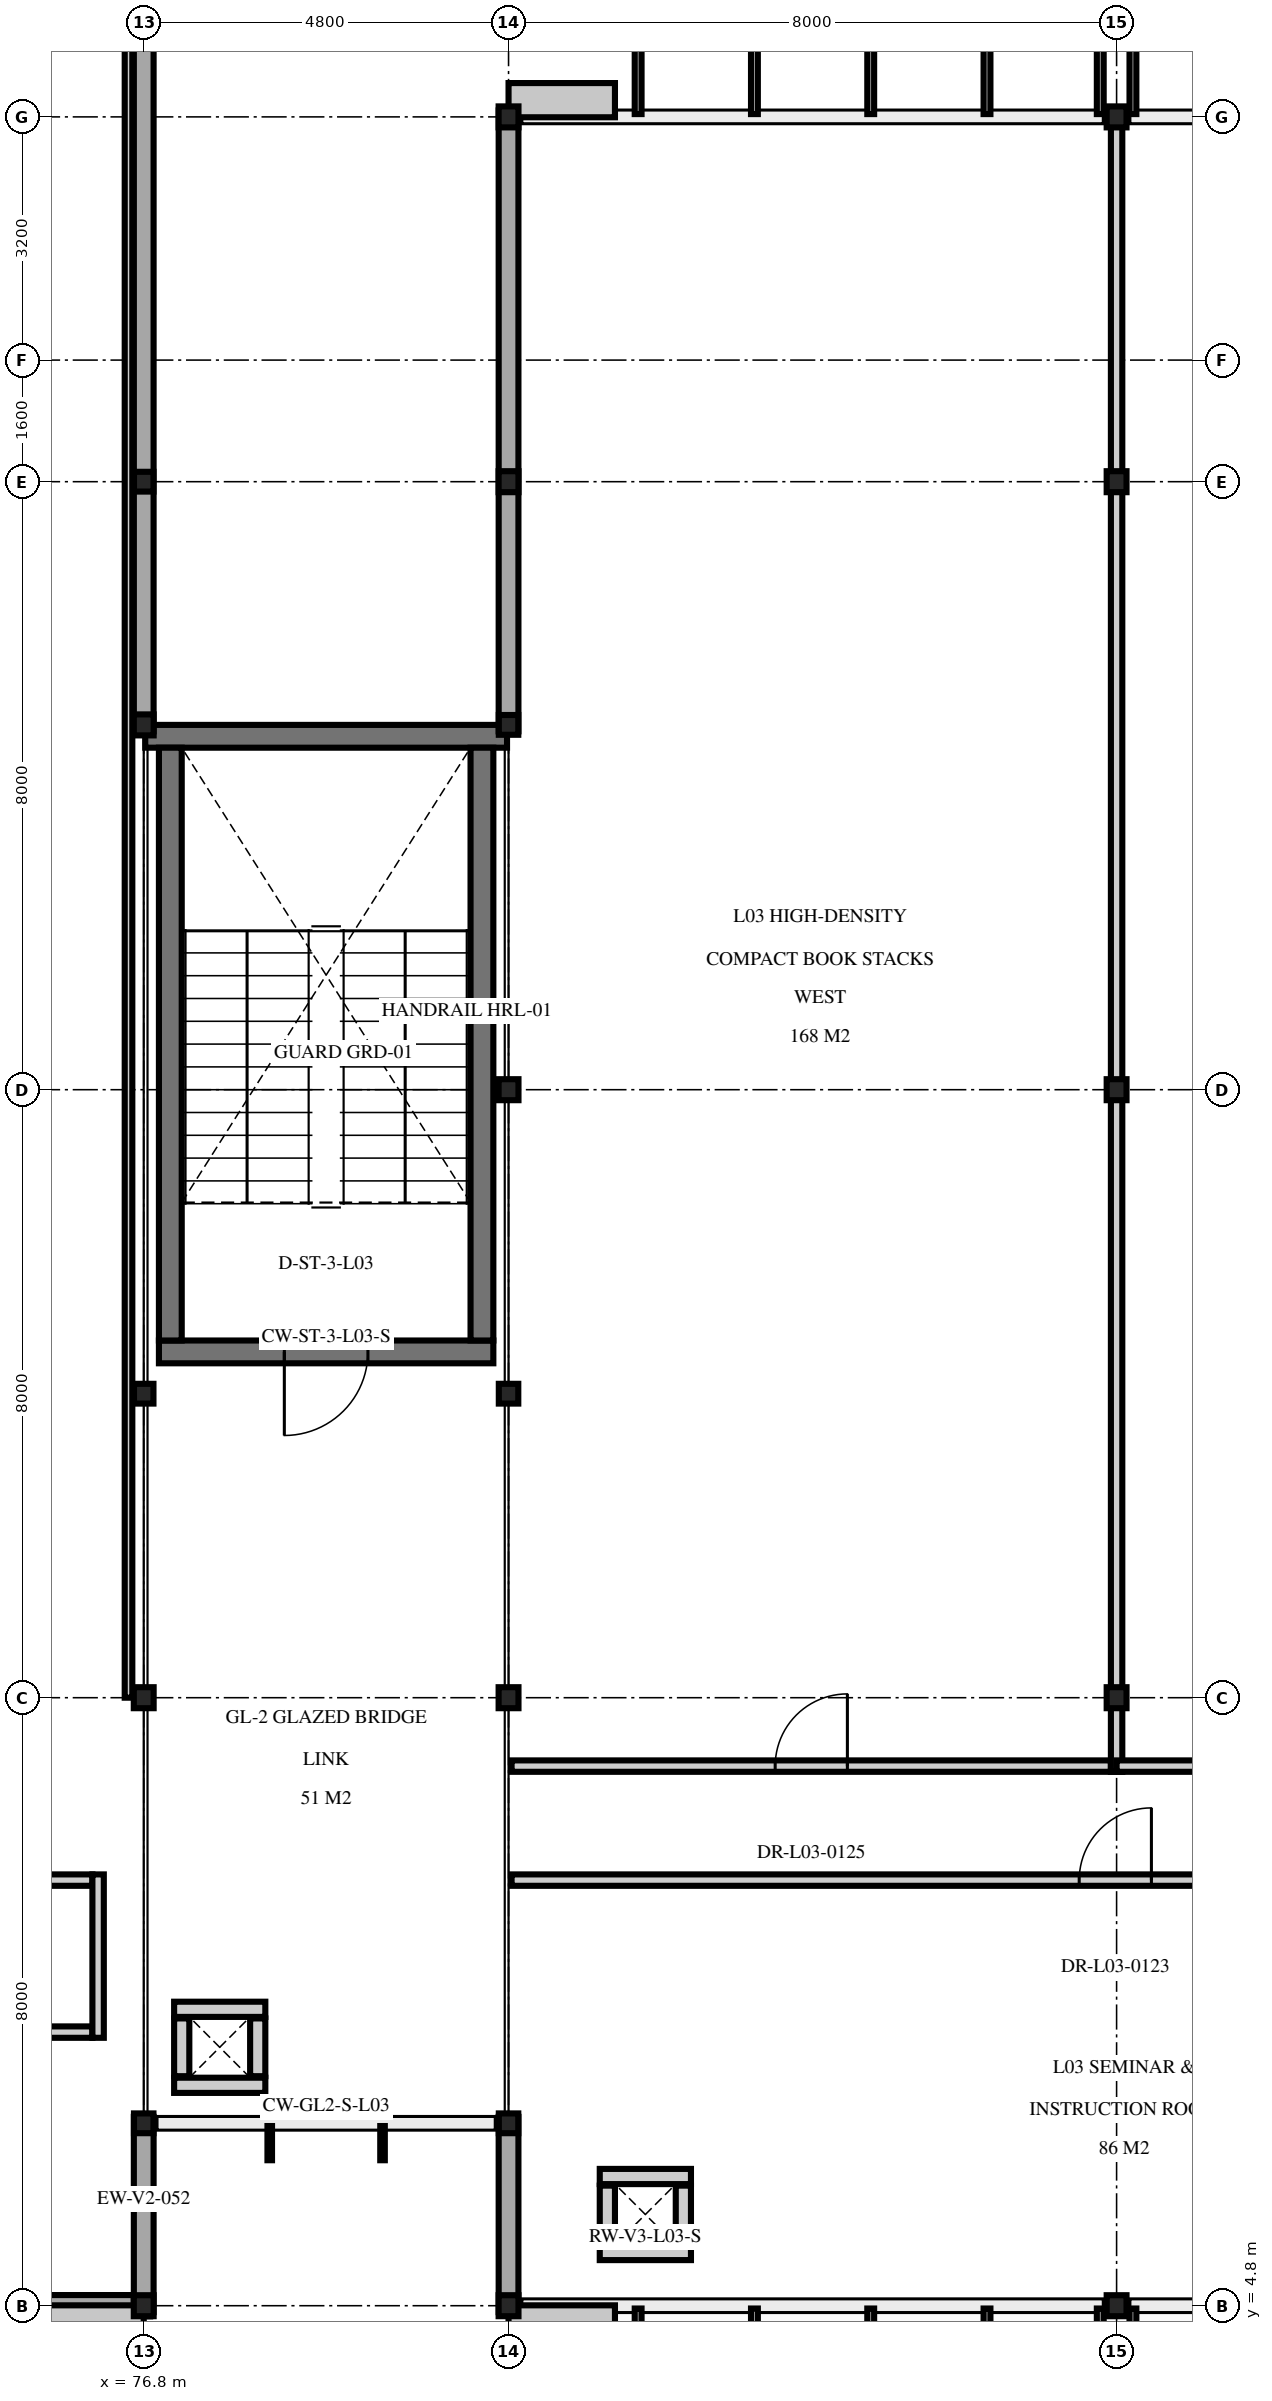
"""IFC4 building model, lengths in metres.
Left out: names, types, materials, properties, quantities, classifications, styles, units other than length and angle.
Written with IfcOpenShell. Run it as: python <this file> out.ifc"""

import sys

from ifc_helpers import new_model, si_unit, direction, frame, frame_2d, origin, origin_2d, place, context, subcontext, project, spatial, rectangle, i_section, extrude, element, fill, save


model = new_model("IFC4")
c1 = context("Model", 3, precision=1e-05, world=origin(), true_north=direction((0.0, 1.0)))
c2 = subcontext(c1, "Body", "Model", "MODEL_VIEW")
j1 = project(units=[si_unit("LENGTHUNIT", "METRE"), si_unit("PLANEANGLEUNIT", "RADIAN")], contexts=[c1])
p1 = place(None, origin())
s1 = spatial("IfcSite", under=j1, at=p1, CompositionType="ELEMENT")
p2 = place(p1, origin())
s2 = spatial("IfcBuilding", under=s1, at=p2, CompositionType="ELEMENT")
p3 = place(p2, frame((0.0, 0.0, 14.1)))
s3 = spatial("IfcBuildingStorey", under=s2, at=p3, CompositionType="ELEMENT", Elevation=14.1)
for number, where, z_axis, x_axis in (
    (1, (76.8, 4.8, 0.0), (0.0, 0.0, 1.0), (1.0, 0.0, 0.0)),
    (2, (76.8, 12.8, 0.0), (0.0, 0.0, 1.0), (1.0, 0.0, 0.0)),
    (3, (76.8, 25.6, 0.0), (0.0, 0.0, 1.0), (1.0, 0.0, 0.0)),
):
    element("IfcColumn", number, at=place(p3, frame(where, z_axis=z_axis, x_axis=x_axis)), inside=s3, PredefinedType="COLUMN", context=c2, shape_type="SweptSolid", body=[
        extrude(i_section(OverallWidth=0.261, OverallDepth=0.276, WebThickness=0.015, FlangeThickness=0.025, at=origin_2d()), origin(), (0.0, 0.0, 1.0), 4.5),
    ])
for number, where, z_axis, x_axis in (
    (4, (76.8, 28.8, 0.0), (0.0, 0.0, 1.0), (1.0, 0.0, 0.0)),
    (5, (76.8, 7.2, 0.0), (0.0, 0.0, 1.0), (1.0, 0.0, 0.0)),
    (6, (76.8, 16.8, 0.0), (0.0, 0.0, 1.0), (1.0, 0.0, 0.0)),
):
    element("IfcColumn", number, at=place(p3, frame(where, z_axis=z_axis, x_axis=x_axis)), inside=s3, PredefinedType="COLUMN", context=c2, shape_type="SweptSolid", body=[
        extrude(i_section(OverallWidth=0.256, OverallDepth=0.26, WebThickness=0.01, FlangeThickness=0.017, at=origin_2d()), origin(), (0.0, 0.0, 1.0), 4.5),
    ])
for number, where, z_axis, x_axis in (
    (7, (81.6, 4.8, 0.0), (0.0, 0.0, 1.0), (1.0, 0.0, 0.0)),
    (8, (81.6, 12.8, 0.0), (0.0, 0.0, 1.0), (1.0, 0.0, 0.0)),
    (9, (81.6, 20.8, 0.0), (0.0, 0.0, 1.0), (1.0, 0.0, 0.0)),
    (10, (81.6, 28.8, 0.0), (0.0, 0.0, 1.0), (1.0, 0.0, 0.0)),
):
    element("IfcColumn", number, at=place(p3, frame(where, z_axis=z_axis, x_axis=x_axis)), inside=s3, PredefinedType="COLUMN", context=c2, shape_type="SweptSolid", body=[
        extrude(i_section(OverallWidth=0.261, OverallDepth=0.276, WebThickness=0.015, FlangeThickness=0.025, at=origin_2d()), origin(), (0.0, 0.0, 1.0), 4.5),
    ])
p4 = place(p3, frame((81.6, 33.6, 0.0), z_axis=(0.0, 0.0, 1.0), x_axis=(1.0, 0.0, 0.0)))
e11 = element("IfcColumn", 11, at=p4, inside=s3, PredefinedType="COLUMN", context=c2, shape_type="SweptSolid", body=[
    extrude(i_section(OverallWidth=0.261, OverallDepth=0.276, WebThickness=0.015, FlangeThickness=0.025, at=origin_2d()), origin(), (0.0, 0.0, 1.0), 4.31),
])
for number, where, z_axis, x_axis in (
    (12, (89.6, 4.8, 0.0), (0.0, 0.0, 1.0), (1.0, 0.0, 0.0)),
    (13, (89.6, 12.8, 0.0), (0.0, 0.0, 1.0), (1.0, 0.0, 0.0)),
    (14, (89.6, 20.8, 0.0), (0.0, 0.0, 1.0), (1.0, 0.0, 0.0)),
    (15, (89.6, 28.8, 0.0), (0.0, 0.0, 1.0), (1.0, 0.0, 0.0)),
):
    element("IfcColumn", number, at=place(p3, frame(where, z_axis=z_axis, x_axis=x_axis)), inside=s3, PredefinedType="COLUMN", context=c2, shape_type="SweptSolid", body=[
        extrude(i_section(OverallWidth=0.261, OverallDepth=0.276, WebThickness=0.015, FlangeThickness=0.025, at=origin_2d()), origin(), (0.0, 0.0, 1.0), 4.5),
    ])
p5 = place(p3, frame((89.6, 33.6, 0.0), z_axis=(0.0, 0.0, 1.0), x_axis=(1.0, 0.0, 0.0)))
e16 = element("IfcColumn", 16, at=p5, inside=s3, PredefinedType="COLUMN", context=c2, shape_type="SweptSolid", body=[
    extrude(i_section(OverallWidth=0.261, OverallDepth=0.276, WebThickness=0.015, FlangeThickness=0.025, at=origin_2d()), origin(), (0.0, 0.0, 1.0), 4.31),
])
for number, where, z_axis, x_axis in (
    (17, (81.6, 7.2, 0.0), (0.0, 0.0, 1.0), (1.0, 0.0, 0.0)),
    (18, (81.6, 16.8, 0.0), (0.0, 0.0, 1.0), (1.0, 0.0, 0.0)),
    (19, (81.6, 25.6, 0.0), (0.0, 0.0, 1.0), (1.0, 0.0, 0.0)),
):
    element("IfcColumn", number, at=place(p3, frame(where, z_axis=z_axis, x_axis=x_axis)), inside=s3, PredefinedType="COLUMN", context=c2, shape_type="SweptSolid", body=[
        extrude(i_section(OverallWidth=0.256, OverallDepth=0.26, WebThickness=0.01, FlangeThickness=0.017, at=origin_2d()), origin(), (0.0, 0.0, 1.0), 4.5),
    ])
p6 = place(p3, frame((81.4, 17.35, 0.0), z_axis=(0.0, 0.0, 1.0), x_axis=(-1.0, 0.0, 0.0)))
e20 = element("IfcWall", 20, at=p6, inside=s3, PredefinedType="SHEAR", context=c2, shape_type="SweptSolid", body=[
    extrude(rectangle(XDim=4.4, YDim=0.3, at=frame_2d((2.2, 0.0))), origin(), (0.0, 0.0, 1.0), 4.25),
])
p7 = place(p6, frame((1.65, 0.0, 0.0)))
e21 = element("IfcOpeningElement", 21, at=p7, cuts=e20, PredefinedType="OPENING", context=c2, shape_type="SweptSolid", body=[
    extrude(rectangle(XDim=1.1, YDim=2.2, at=frame_2d((0.55, 1.1))), frame((0.0, 0.16, 0.0), z_axis=(0.0, -1.0, 0.0), x_axis=(1.0, 0.0, 0.0)), (0.0, 0.0, 1.0), 0.32),
])
p8 = place(p3, frame((76.82, 25.45, 0.0), z_axis=(0.0, 0.0, 1.0), x_axis=(1.0, 0.0, 0.0)))
e22 = element("IfcWall", 22, at=p8, inside=s3, PredefinedType="SHEAR", context=c2, shape_type="SweptSolid", body=[
    extrude(rectangle(XDim=4.76, YDim=0.3, at=frame_2d((2.38, 0.0))), origin(), (0.0, 0.0, 1.0), 4.25),
])
for number, where, z_axis, x_axis in (
    (23, (77.15, 17.5, 0.0), (0.0, 0.0, 1.0), (0.0, 1.0, 0.0)),
    (24, (81.25, 25.3, 0.0), (0.0, 0.0, 1.0), (0.0, -1.0, 0.0)),
):
    element("IfcWall", number, at=place(p3, frame(where, z_axis=z_axis, x_axis=x_axis)), inside=s3, PredefinedType="SHEAR", context=c2, shape_type="SweptSolid", body=[
        extrude(rectangle(XDim=7.8, YDim=0.3, at=frame_2d((3.9, 0.0))), origin(), (0.0, 0.0, 1.0), 4.25),
    ])
for number, where, z_axis, x_axis in (
    (25, (84.0, 5.5, 0.0), (0.0, 0.0, 1.0), (-1.0, 0.0, 0.0)),
    (26, (82.8, 6.5, 0.0), (0.0, 0.0, 1.0), (1.0, 0.0, 0.0)),
):
    element("IfcWall", number, at=place(p3, frame(where, z_axis=z_axis, x_axis=x_axis)), inside=s3, PredefinedType="PARTITIONING", context=c2, shape_type="SweptSolid", body=[
        extrude(rectangle(XDim=1.2, YDim=0.2, at=frame_2d((0.6, 0.0))), origin(), (0.0, 0.0, 1.0), 3.75),
    ])
for number, where, z_axis, x_axis in (
    (27, (82.9, 5.62, 0.0), (0.0, 0.0, 1.0), (0.0, 1.0, 0.0)),
    (28, (83.9, 6.38, 0.0), (0.0, 0.0, 1.0), (0.0, -1.0, 0.0)),
):
    element("IfcWall", number, at=place(p3, frame(where, z_axis=z_axis, x_axis=x_axis)), inside=s3, PredefinedType="PARTITIONING", context=c2, shape_type="SweptSolid", body=[
        extrude(rectangle(XDim=0.76, YDim=0.2, at=frame_2d((0.38, 0.0))), origin(), (0.0, 0.0, 1.0), 3.75),
    ])
for number, where, z_axis, x_axis in (
    (29, (78.4, 7.7, 0.0), (0.0, 0.0, 1.0), (-1.0, 0.0, 0.0)),
    (30, (77.2, 8.7, 0.0), (0.0, 0.0, 1.0), (1.0, 0.0, 0.0)),
):
    element("IfcWall", number, at=place(p3, frame(where, z_axis=z_axis, x_axis=x_axis)), inside=s3, PredefinedType="PARTITIONING", context=c2, shape_type="SweptSolid", body=[
        extrude(rectangle(XDim=1.2, YDim=0.2, at=frame_2d((0.6, 0.0))), origin(), (0.0, 0.0, 1.0), 3.75),
    ])
for number, where, z_axis, x_axis in (
    (31, (77.3, 7.82, 0.0), (0.0, 0.0, 1.0), (0.0, 1.0, 0.0)),
    (32, (78.3, 8.58, 0.0), (0.0, 0.0, 1.0), (0.0, -1.0, 0.0)),
):
    element("IfcWall", number, at=place(p3, frame(where, z_axis=z_axis, x_axis=x_axis)), inside=s3, PredefinedType="PARTITIONING", context=c2, shape_type="SweptSolid", body=[
        extrude(rectangle(XDim=0.76, YDim=0.2, at=frame_2d((0.38, 0.0))), origin(), (0.0, 0.0, 1.0), 3.75),
    ])
p9 = place(p3, frame((76.885, 4.8, 0.0), z_axis=(0.0, 0.0, 1.0), x_axis=(-1.0, 0.0, 0.0)))
e33 = element("IfcWall", 33, at=p9, inside=s3, PredefinedType="SOLIDWALL", context=c2, shape_type="SweptSolid", body=[
    extrude(rectangle(XDim=9.77, YDim=0.28, at=frame_2d((4.885, 0.0))), origin(), (0.0, 0.0, 1.0), 3.862),
])
p10 = place(p9, frame((3.685, 0.0, 0.95)))
e34 = element("IfcOpeningElement", 34, at=p10, cuts=e33, PredefinedType="OPENING", context=c2, shape_type="SweptSolid", body=[
    extrude(rectangle(XDim=2.4, YDim=2.1, at=frame_2d((1.2, 1.05))), frame((0.0, 0.15, 0.0), z_axis=(0.0, -1.0, 0.0), x_axis=(1.0, 0.0, 0.0)), (0.0, 0.0, 1.0), 0.3),
])
p11 = place(p3, frame((76.8, 7.285, 0.0), z_axis=(0.0, 0.0, 1.0), x_axis=(0.0, -1.0, 0.0)))
e35 = element("IfcWall", 35, at=p11, inside=s3, PredefinedType="SOLIDWALL", context=c2, shape_type="SweptSolid", body=[
    extrude(rectangle(XDim=2.57, YDim=0.26, at=frame_2d((1.285, 0.0))), origin(), (0.0, 0.0, 1.0), 3.835),
])
p12 = place(p3, frame((76.8, 36.885, 0.0), z_axis=(0.0, 0.0, 1.0), x_axis=(0.0, -1.0, 0.0)))
e36 = element("IfcWall", 36, at=p12, inside=s3, PredefinedType="SOLIDWALL", context=c2, shape_type="SweptSolid", body=[
    extrude(rectangle(XDim=11.37, YDim=0.26, at=frame_2d((5.685, 0.0))), origin(), (0.0, 0.0, 1.0), 3.835),
])
p13 = place(p3, frame((81.6, 4.715, 0.0), z_axis=(0.0, 0.0, 1.0), x_axis=(0.0, 1.0, 0.0)))
e37 = element("IfcWall", 37, at=p13, inside=s3, PredefinedType="SOLIDWALL", context=c2, shape_type="SweptSolid", body=[
    extrude(rectangle(XDim=2.57, YDim=0.26, at=frame_2d((1.285, 0.0))), origin(), (0.0, 0.0, 1.0), 3.686),
])
p14 = place(p3, frame((81.6, 25.515, 0.0), z_axis=(0.0, 0.0, 1.0), x_axis=(0.0, 1.0, 0.0)))
e38 = element("IfcWall", 38, at=p14, inside=s3, PredefinedType="SOLIDWALL", context=c2, shape_type="SweptSolid", body=[
    extrude(rectangle(XDim=8.17, YDim=0.26, at=frame_2d((4.085, 0.0))), origin(), (0.0, 0.0, 1.0), 3.686),
])
p15 = place(p3, frame((68.675, 8.4, 0.0), z_axis=(0.0, 0.0, 1.0), x_axis=(1.0, 0.0, 0.0)))
e39 = element("IfcWall", 39, at=p15, inside=s3, PredefinedType="PARTITIONING", context=c2, shape_type="SweptSolid", body=[
    extrude(rectangle(XDim=7.45, YDim=0.15, at=frame_2d((3.725, 0.0))), origin(), (0.0, 0.0, 1.0), 4.015),
])
p16 = place(p3, frame((68.675, 10.4, 0.0), z_axis=(0.0, 0.0, 1.0), x_axis=(1.0, 0.0, 0.0)))
e40 = element("IfcWall", 40, at=p16, inside=s3, PredefinedType="PARTITIONING", context=c2, shape_type="SweptSolid", body=[
    extrude(rectangle(XDim=7.45, YDim=0.15, at=frame_2d((3.725, 0.0))), origin(), (0.0, 0.0, 1.0), 4.015),
])
p17 = place(p16, frame((3.25, 0.0, 0.0)))
e41 = element("IfcOpeningElement", 41, at=p17, cuts=e40, PredefinedType="OPENING", context=c2, shape_type="SweptSolid", body=[
    extrude(rectangle(XDim=0.95, YDim=2.15, at=frame_2d((0.475, 1.075))), frame((0.0, 0.085, 0.0), z_axis=(0.0, -1.0, 0.0), x_axis=(1.0, 0.0, 0.0)), (0.0, 0.0, 1.0), 0.17),
])
p18 = place(p3, frame((76.2, 8.325, 0.0), z_axis=(0.0, 0.0, 1.0), x_axis=(0.0, 1.0, 0.0)))
e42 = element("IfcWall", 42, at=p18, inside=s3, PredefinedType="PARTITIONING", context=c2, shape_type="SweptSolid", body=[
    extrude(rectangle(XDim=2.15, YDim=0.15, at=frame_2d((1.075, 0.0))), origin(), (0.0, 0.0, 1.0), 4.25),
])
p19 = place(p3, frame((76.6, 12.8, 0.0), z_axis=(0.0, 0.0, 1.0), x_axis=(0.0, 1.0, 0.0)))
e43 = element("IfcWall", 43, at=p19, inside=s3, PredefinedType="MOVABLE", context=c2, shape_type="SweptSolid", body=[
    extrude(rectangle(XDim=23.96, YDim=0.1, at=frame_2d((11.98, 0.0))), origin(), (0.0, 0.0, 1.0), 3.862),
])
p20 = place(p3, frame((81.64, 10.4, 0.0), z_axis=(0.0, 0.0, 1.0), x_axis=(1.0, 0.0, 0.0)))
e44 = element("IfcWall", 44, at=p20, inside=s3, PredefinedType="PARTITIONING", context=c2, shape_type="SweptSolid", body=[
    extrude(rectangle(XDim=15.885, YDim=0.15, at=frame_2d((7.942, 0.0))), origin(), (0.0, 0.0, 1.0), 3.675),
])
p21 = place(p20, frame((7.468, 0.0, 0.0)))
e45 = element("IfcOpeningElement", 45, at=p21, cuts=e44, PredefinedType="OPENING", context=c2, shape_type="SweptSolid", body=[
    extrude(rectangle(XDim=0.95, YDim=2.15, at=frame_2d((0.475, 1.075))), frame((0.0, 0.085, 0.0), z_axis=(0.0, -1.0, 0.0), x_axis=(1.0, 0.0, 0.0)), (0.0, 0.0, 1.0), 0.17),
])
p22 = place(p3, frame((81.64, 11.9, 0.0), z_axis=(0.0, 0.0, 1.0), x_axis=(1.0, 0.0, 0.0)))
e46 = element("IfcWall", 46, at=p22, inside=s3, PredefinedType="PARTITIONING", context=c2, shape_type="SweptSolid", body=[
    extrude(rectangle(XDim=7.885, YDim=0.15, at=frame_2d((3.942, 0.0))), origin(), (0.0, 0.0, 1.0), 3.675),
])
p23 = place(p22, frame((3.468, 0.0, 0.0)))
e47 = element("IfcOpeningElement", 47, at=p23, cuts=e46, PredefinedType="OPENING", context=c2, shape_type="SweptSolid", body=[
    extrude(rectangle(XDim=0.95, YDim=2.15, at=frame_2d((0.475, 1.075))), frame((0.0, 0.085, 0.0), z_axis=(0.0, -1.0, 0.0), x_axis=(1.0, 0.0, 0.0)), (0.0, 0.0, 1.0), 0.17),
])
p24 = place(p3, frame((89.6, 11.825, 0.0), z_axis=(0.0, 0.0, 1.0), x_axis=(0.0, 1.0, 0.0)))
e48 = element("IfcWall", 48, at=p24, inside=s3, PredefinedType="PARTITIONING", context=c2, shape_type="SweptSolid", body=[
    extrude(rectangle(XDim=21.735, YDim=0.15, at=frame_2d((10.868, 0.0))), origin(), (0.0, 0.0, 1.0), 3.686),
])
p25 = place(p3, frame((89.6, 11.9, 0.0), z_axis=(0.0, 0.0, 1.0), x_axis=(1.0, 0.0, 0.0)))
e49 = element("IfcWall", 49, at=p25, inside=s3, PredefinedType="PARTITIONING", context=c2, shape_type="SweptSolid", body=[
    extrude(rectangle(XDim=35.16, YDim=0.15, at=frame_2d((17.58, 0.0))), origin(), (0.0, 0.0, 1.0), 3.675),
])
p26 = place(p25, frame((18.605, 0.0, 0.0)))
e50 = element("IfcOpeningElement", 50, at=p26, cuts=e49, PredefinedType="OPENING", context=c2, shape_type="SweptSolid", body=[
    extrude(rectangle(XDim=0.95, YDim=2.15, at=frame_2d((0.475, 1.075))), frame((0.0, 0.085, 0.0), z_axis=(0.0, -1.0, 0.0), x_axis=(1.0, 0.0, 0.0)), (0.0, 0.0, 1.0), 0.17),
])
p27 = place(p7, origin())
e51 = element("IfcDoor", 51, at=p27, inside=s3, OperationType="SINGLE_SWING_RIGHT", PredefinedType="DOOR", context=c2, shape_type="SweptSolid", body=[
    extrude(rectangle(XDim=1.1, YDim=2.2, at=frame_2d((0.55, 1.1))), frame((0.0, 0.025, 0.0), z_axis=(0.0, -1.0, 0.0), x_axis=(1.0, 0.0, 0.0)), (0.0, 0.0, 1.0), 0.05),
])
fill(e21, e51)
p28 = place(p21, origin())
e52 = element("IfcDoor", 52, at=p28, inside=s3, OperationType="SINGLE_SWING_RIGHT", PredefinedType="DOOR", context=c2, shape_type="SweptSolid", body=[
    extrude(rectangle(XDim=0.95, YDim=2.15, at=frame_2d((0.475, 1.075))), frame((0.0, 0.025, 0.0), z_axis=(0.0, -1.0, 0.0), x_axis=(1.0, 0.0, 0.0)), (0.0, 0.0, 1.0), 0.05),
])
fill(e45, e52)
p29 = place(p23, origin())
e53 = element("IfcDoor", 53, at=p29, inside=s3, OperationType="SINGLE_SWING_RIGHT", PredefinedType="DOOR", context=c2, shape_type="SweptSolid", body=[
    extrude(rectangle(XDim=0.95, YDim=2.15, at=frame_2d((0.475, 1.075))), frame((0.0, 0.025, 0.0), z_axis=(0.0, -1.0, 0.0), x_axis=(1.0, 0.0, 0.0)), (0.0, 0.0, 1.0), 0.05),
])
fill(e47, e53)
save(model, sys.argv[1])
